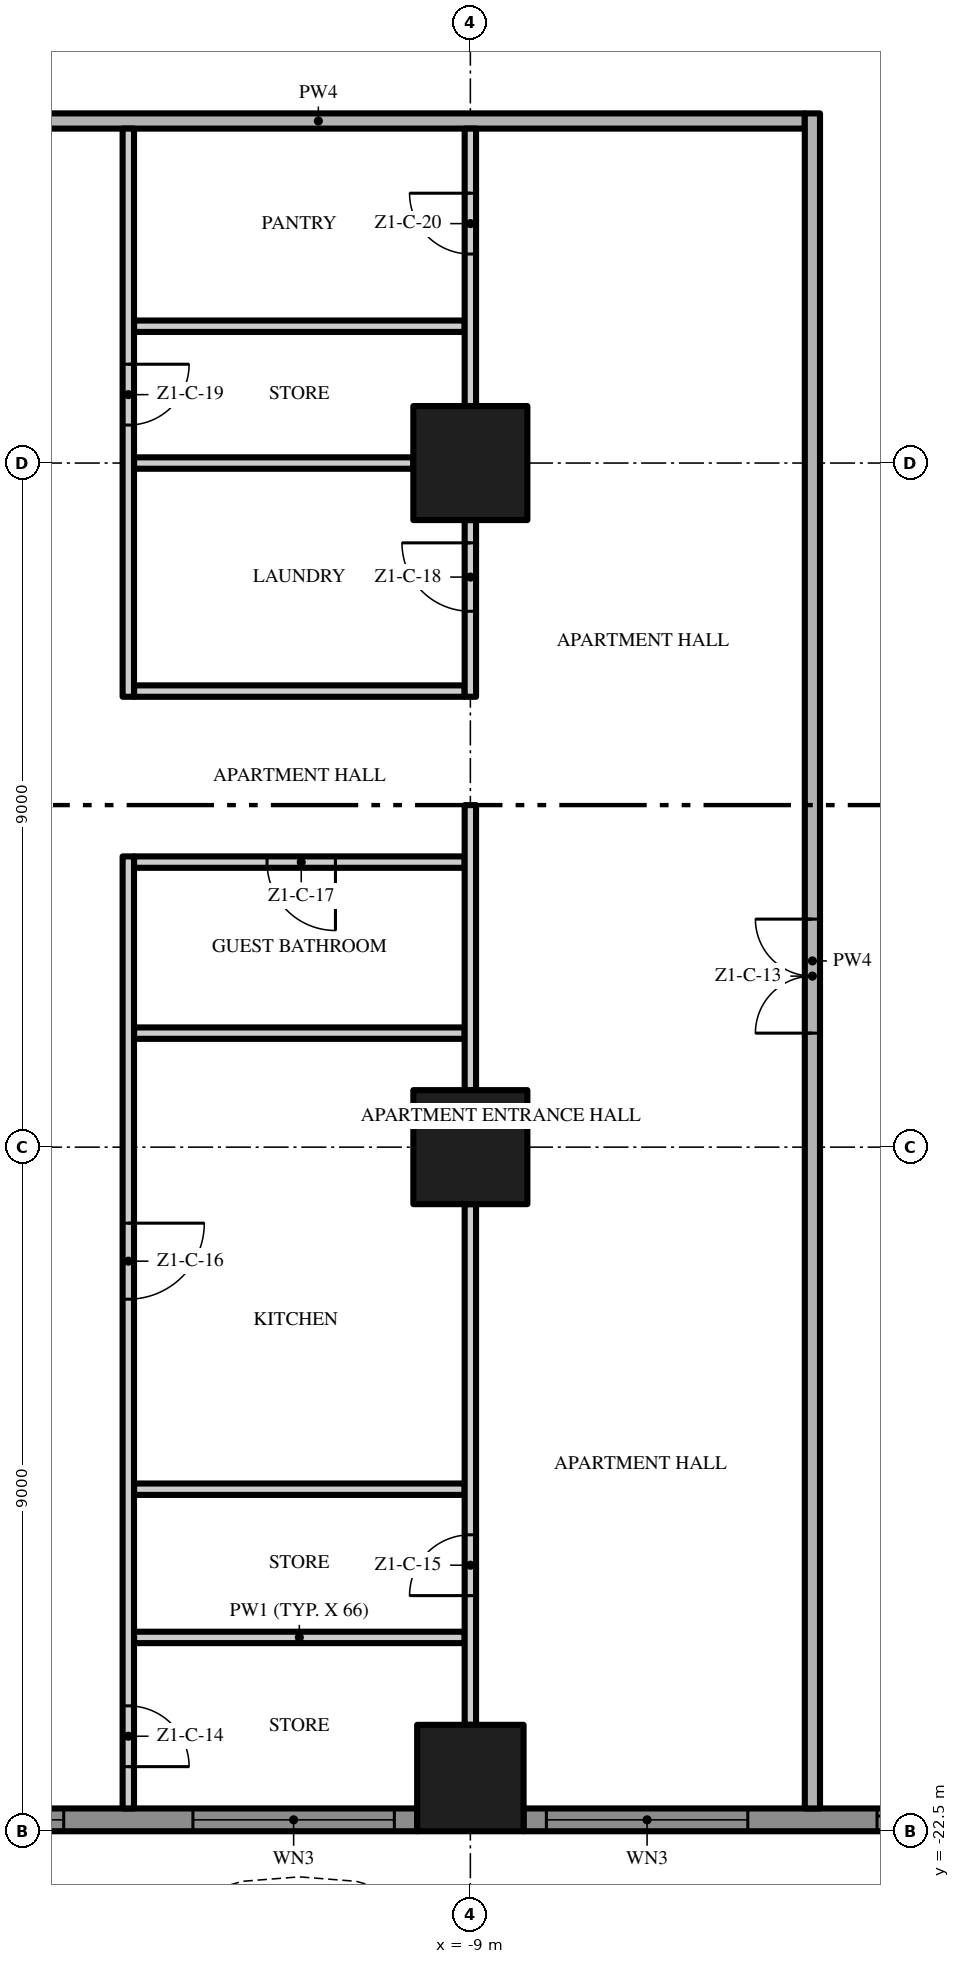
"""IFC4 building model, lengths in metres.
Left out: names, types, materials, properties, quantities, classifications, styles, units other than length and angle.
Written with IfcOpenShell. Run it as: python <this file> out.ifc"""

import sys

from ifc_helpers import new_model, si_unit, direction, frame, frame_2d, origin, origin_2d, place, context, subcontext, project, spatial, polyline, rectangle, outline, extrude, element, fill, save


model = new_model("IFC4")
c1 = context("Model", 3, precision=1e-05, world=origin(), true_north=direction((0.0, 1.0)))
c2 = subcontext(c1, "Body", "Model", "MODEL_VIEW")
j1 = project(units=[si_unit("LENGTHUNIT", "METRE"), si_unit("PLANEANGLEUNIT", "RADIAN")], contexts=[c1])
p1 = place(None, origin())
s1 = spatial("IfcSite", under=j1, at=p1, CompositionType="ELEMENT")
p2 = place(p1, origin())
s2 = spatial("IfcBuilding", under=s1, at=p2, CompositionType="ELEMENT")
p3 = place(p2, frame((0.0, 0.0, 45.4)))
s3 = spatial("IfcBuildingStorey", under=s2, at=p3, CompositionType="ELEMENT", Elevation=45.4)
p4 = place(p3, frame((-9.0, -13.5, 0.0), z_axis=(0.0, 0.0, 1.0), x_axis=(1.0, 0.0, 0.0)))
e1 = element("IfcColumn", 1, at=p4, inside=s3, PredefinedType="COLUMN", context=c2, shape_type="SweptSolid", body=[
    extrude(rectangle(XDim=1.5, YDim=1.5, at=origin_2d()), origin(), (0.0, 0.0, 1.0), 3.5),
])
p5 = place(p3, frame((-9.0, -21.8, 0.0), z_axis=(0.0, 0.0, 1.0), x_axis=(1.0, 0.0, 0.0)))
e2 = element("IfcColumn", 2, at=p5, inside=s3, PredefinedType="COLUMN", context=c2, shape_type="SweptSolid", body=[
    extrude(rectangle(XDim=1.4, YDim=1.4, at=origin_2d()), origin(), (0.0, 0.0, 1.0), 3.5),
])
p6 = place(p3, frame((-9.0, -4.5, 0.0), z_axis=(0.0, 0.0, 1.0), x_axis=(1.0, 0.0, 0.0)))
e3 = element("IfcColumn", 3, at=p6, inside=s3, PredefinedType="COLUMN", context=c2, shape_type="SweptSolid", body=[
    extrude(rectangle(XDim=1.5, YDim=1.5, at=origin_2d()), origin(), (0.0, 0.0, 1.0), 3.5),
])
p7 = place(p3, frame((-9.7, -22.35, 0.0), z_axis=(0.0, 0.0, 1.0), x_axis=(-1.0, 0.0, 0.0)))
e4 = element("IfcWall", 4, at=p7, inside=s3, PredefinedType="SOLIDWALL", context=c2, shape_type="SweptSolid", body=[
    extrude(rectangle(XDim=7.6, YDim=0.3, at=frame_2d((3.8, 0.0))), origin(), (0.0, 0.0, 1.0), 3.5),
])
p8 = place(p7, frame((4.65, 0.0, 0.45)))
e5 = element("IfcOpeningElement", 5, at=p8, cuts=e4, PredefinedType="OPENING", context=c2, shape_type="SweptSolid", body=[
    extrude(rectangle(XDim=2.65, YDim=2.65, at=frame_2d((1.325, 1.325))), frame((0.0, 0.16, 0.0), z_axis=(0.0, -1.0, 0.0), x_axis=(1.0, 0.0, 0.0)), (0.0, 0.0, 1.0), 0.32),
])
p9 = place(p7, frame((0.3, 0.0, 0.45)))
e6 = element("IfcOpeningElement", 6, at=p9, cuts=e4, PredefinedType="OPENING", context=c2, shape_type="SweptSolid", body=[
    extrude(rectangle(XDim=2.65, YDim=2.65, at=frame_2d((1.325, 1.325))), frame((0.0, 0.16, 0.0), z_axis=(0.0, -1.0, 0.0), x_axis=(1.0, 0.0, 0.0)), (0.0, 0.0, 1.0), 0.32),
])
p10 = place(p3, frame((-0.7, -22.35, 0.0), z_axis=(0.0, 0.0, 1.0), x_axis=(-1.0, 0.0, 0.0)))
e7 = element("IfcWall", 7, at=p10, inside=s3, PredefinedType="SOLIDWALL", context=c2, shape_type="SweptSolid", body=[
    extrude(rectangle(XDim=7.6, YDim=0.3, at=frame_2d((3.8, 0.0))), origin(), (0.0, 0.0, 1.0), 3.5),
])
p11 = place(p10, frame((4.65, 0.0, 0.45)))
e8 = element("IfcOpeningElement", 8, at=p11, cuts=e7, PredefinedType="OPENING", context=c2, shape_type="SweptSolid", body=[
    extrude(rectangle(XDim=2.65, YDim=2.65, at=frame_2d((1.325, 1.325))), frame((0.0, 0.16, 0.0), z_axis=(0.0, -1.0, 0.0), x_axis=(1.0, 0.0, 0.0)), (0.0, 0.0, 1.0), 0.32),
])
p12 = place(p10, frame((0.3, 0.0, 0.0)))
e9 = element("IfcOpeningElement", 9, at=p12, cuts=e7, PredefinedType="OPENING", context=c2, shape_type="SweptSolid", body=[
    extrude(rectangle(XDim=2.65, YDim=2.4, at=frame_2d((1.325, 1.2))), frame((0.0, 0.16, 0.0), z_axis=(0.0, -1.0, 0.0), x_axis=(1.0, 0.0, 0.0)), (0.0, 0.0, 1.0), 0.32),
])
p13 = place(p3, origin())
e10 = element("IfcWall", 10, at=p13, inside=s3, PredefinedType="USERDEFINED", context=c2, shape_type="SweptSolid", body=[
    extrude(outline(polyline([(-22.5, -24.3), (-21.0, -25.005), (-19.5, -25.441), (-18.75, -25.5), (-18.0, -25.441), (-16.5, -25.005), (-15.0, -24.3), (-13.5, -23.595), (-12.0, -23.159), (-11.25, -23.1), (-10.5, -23.159), (-9.0, -23.595), (-7.5, -24.3), (-6.0, -25.005), (-4.5, -25.441), (-3.75, -25.5), (-3.0, -25.441), (-1.5, -25.005), (0.0, -24.3), (1.5, -23.595), (3.0, -23.159), (3.75, -23.1), (4.5, -23.159), (6.0, -23.595), (7.5, -24.3), (9.0, -25.005), (10.5, -25.441), (11.25, -25.5), (12.0, -25.441), (13.5, -25.005), (15.0, -24.3), (16.5, -23.595), (18.0, -23.159), (18.75, -23.1), (19.5, -23.159), (21.0, -23.595), (22.5, -24.3), (22.606, -24.074), (21.089, -23.36), (19.545, -22.911), (18.75, -22.849), (17.955, -22.911), (16.411, -23.36), (14.894, -24.074), (13.411, -24.771), (11.955, -25.194), (11.25, -25.249), (10.545, -25.194), (9.089, -24.771), (7.606, -24.074), (6.089, -23.36), (4.545, -22.911), (3.75, -22.849), (2.955, -22.911), (1.411, -23.36), (-0.106, -24.074), (-1.589, -24.771), (-3.045, -25.194), (-3.75, -25.249), (-4.455, -25.194), (-5.911, -24.771), (-7.394, -24.074), (-8.911, -23.36), (-10.455, -22.911), (-11.25, -22.849), (-12.045, -22.911), (-13.589, -23.36), (-15.106, -24.074), (-16.589, -24.771), (-18.045, -25.194), (-18.75, -25.249), (-19.455, -25.194), (-20.911, -24.771), (-22.394, -24.074), (-22.5, -24.3)])), origin(), (0.0, 0.0, 1.0), 0.9),
])
for number, where, z_axis, x_axis in (
    (11, (-13.425, -19.95, 0.0), (0.0, 0.0, 1.0), (1.0, 0.0, 0.0)),
    (12, (-13.425, -18.0, 0.0), (0.0, 0.0, 1.0), (1.0, 0.0, 0.0)),
    (13, (-13.425, -12.0, 0.0), (0.0, 0.0, 1.0), (1.0, 0.0, 0.0)),
):
    element("IfcWall", number, at=place(p3, frame(where, z_axis=z_axis, x_axis=x_axis)), inside=s3, PredefinedType="PARTITIONING", context=c2, shape_type="SweptSolid", body=[
        extrude(rectangle(XDim=4.35, YDim=0.15, at=frame_2d((2.175, 0.0))), origin(), (0.0, 0.0, 1.0), 3.5),
    ])
p14 = place(p3, frame((-9.075, -9.75, 0.0), z_axis=(0.0, 0.0, 1.0), x_axis=(-1.0, 0.0, 0.0)))
e14 = element("IfcWall", 14, at=p14, inside=s3, PredefinedType="PARTITIONING", context=c2, shape_type="SweptSolid", body=[
    extrude(rectangle(XDim=4.35, YDim=0.15, at=frame_2d((2.175, 0.0))), origin(), (0.0, 0.0, 1.0), 3.5),
])
p15 = place(p14, frame((1.7, 0.0, 0.0)))
e15 = element("IfcOpeningElement", 15, at=p15, cuts=e14, PredefinedType="OPENING", context=c2, shape_type="SweptSolid", body=[
    extrude(rectangle(XDim=0.9, YDim=2.1, at=frame_2d((0.45, 1.05))), frame((0.0, 0.085, 0.0), z_axis=(0.0, -1.0, 0.0), x_axis=(1.0, 0.0, 0.0)), (0.0, 0.0, 1.0), 0.17),
])
p16 = place(p3, frame((-13.425, -7.5, 0.0), z_axis=(0.0, 0.0, 1.0), x_axis=(1.0, 0.0, 0.0)))
e16 = element("IfcWall", 16, at=p16, inside=s3, PredefinedType="PARTITIONING", context=c2, shape_type="SweptSolid", body=[
    extrude(rectangle(XDim=4.35, YDim=0.15, at=frame_2d((2.175, 0.0))), origin(), (0.0, 0.0, 1.0), 3.5),
])
p17 = place(p3, frame((-13.425, -4.5, 0.0), z_axis=(0.0, 0.0, 1.0), x_axis=(1.0, 0.0, 0.0)))
e17 = element("IfcWall", 17, at=p17, inside=s3, PredefinedType="PARTITIONING", context=c2, shape_type="SweptSolid", body=[
    extrude(rectangle(XDim=3.675, YDim=0.15, at=frame_2d((1.837, 0.0))), origin(), (0.0, 0.0, 1.0), 3.5),
])
p18 = place(p3, frame((-13.425, -2.7, 0.0), z_axis=(0.0, 0.0, 1.0), x_axis=(1.0, 0.0, 0.0)))
e18 = element("IfcWall", 18, at=p18, inside=s3, PredefinedType="PARTITIONING", context=c2, shape_type="SweptSolid", body=[
    extrude(rectangle(XDim=4.35, YDim=0.15, at=frame_2d((2.175, 0.0))), origin(), (0.0, 0.0, 1.0), 3.5),
])
p19 = place(p3, frame((-17.4, 0.0, 0.0), z_axis=(0.0, 0.0, 1.0), x_axis=(1.0, 0.0, 0.0)))
e19 = element("IfcWall", 19, at=p19, inside=s3, PredefinedType="PARTITIONING", context=c2, shape_type="SweptSolid", body=[
    extrude(rectangle(XDim=12.8, YDim=0.2, at=frame_2d((6.4, 0.0))), origin(), (0.0, 0.0, 1.0), 3.5),
])
p20 = place(p3, frame((-13.5, -9.675, 0.0), z_axis=(0.0, 0.0, 1.0), x_axis=(0.0, -1.0, 0.0)))
e20 = element("IfcWall", 20, at=p20, inside=s3, PredefinedType="PARTITIONING", context=c2, shape_type="SweptSolid", body=[
    extrude(rectangle(XDim=12.525, YDim=0.15, at=frame_2d((6.263, 0.0))), origin(), (0.0, 0.0, 1.0), 3.5),
])
p21 = place(p20, frame((11.175, 0.0, 0.0)))
e21 = element("IfcOpeningElement", 21, at=p21, cuts=e20, PredefinedType="OPENING", context=c2, shape_type="SweptSolid", body=[
    extrude(rectangle(XDim=0.8, YDim=2.0, at=frame_2d((0.4, 1.0))), frame((0.0, 0.085, 0.0), z_axis=(0.0, -1.0, 0.0), x_axis=(1.0, 0.0, 0.0)), (0.0, 0.0, 1.0), 0.17),
])
p22 = place(p20, frame((4.825, 0.0, 0.0)))
e22 = element("IfcOpeningElement", 22, at=p22, cuts=e20, PredefinedType="OPENING", context=c2, shape_type="SweptSolid", body=[
    extrude(rectangle(XDim=1.0, YDim=2.4, at=frame_2d((0.5, 1.2))), frame((0.0, 0.085, 0.0), z_axis=(0.0, -1.0, 0.0), x_axis=(1.0, 0.0, 0.0)), (0.0, 0.0, 1.0), 0.17),
])
p23 = place(p3, frame((-13.5, -0.1, 0.0), z_axis=(0.0, 0.0, 1.0), x_axis=(0.0, -1.0, 0.0)))
e23 = element("IfcWall", 23, at=p23, inside=s3, PredefinedType="PARTITIONING", context=c2, shape_type="SweptSolid", body=[
    extrude(rectangle(XDim=7.475, YDim=0.15, at=frame_2d((3.737, 0.0))), origin(), (0.0, 0.0, 1.0), 3.5),
])
p24 = place(p23, frame((3.1, 0.0, 0.0)))
e24 = element("IfcOpeningElement", 24, at=p24, cuts=e23, PredefinedType="OPENING", context=c2, shape_type="SweptSolid", body=[
    extrude(rectangle(XDim=0.8, YDim=2.0, at=frame_2d((0.4, 1.0))), frame((0.0, 0.085, 0.0), z_axis=(0.0, -1.0, 0.0), x_axis=(1.0, 0.0, 0.0)), (0.0, 0.0, 1.0), 0.17),
])
p25 = place(p3, frame((-9.0, -21.1, 0.0), z_axis=(0.0, 0.0, 1.0), x_axis=(0.0, 1.0, 0.0)))
e25 = element("IfcWall", 25, at=p25, inside=s3, PredefinedType="PARTITIONING", context=c2, shape_type="SweptSolid", body=[
    extrude(rectangle(XDim=6.85, YDim=0.15, at=frame_2d((3.425, 0.0))), origin(), (0.0, 0.0, 1.0), 3.5),
])
p26 = place(p25, frame((1.7, 0.0, 0.0)))
e26 = element("IfcOpeningElement", 26, at=p26, cuts=e25, PredefinedType="OPENING", context=c2, shape_type="SweptSolid", body=[
    extrude(rectangle(XDim=0.8, YDim=2.0, at=frame_2d((0.4, 1.0))), frame((0.0, 0.085, 0.0), z_axis=(0.0, -1.0, 0.0), x_axis=(1.0, 0.0, 0.0)), (0.0, 0.0, 1.0), 0.17),
])
p27 = place(p3, frame((-9.0, -12.75, 0.0), z_axis=(0.0, 0.0, 1.0), x_axis=(0.0, 1.0, 0.0)))
e27 = element("IfcWall", 27, at=p27, inside=s3, PredefinedType="PARTITIONING", context=c2, shape_type="SweptSolid", body=[
    extrude(rectangle(XDim=3.75, YDim=0.15, at=frame_2d((1.875, 0.0))), origin(), (0.0, 0.0, 1.0), 3.5),
])
p28 = place(p3, frame((-9.0, -7.575, 0.0), z_axis=(0.0, 0.0, 1.0), x_axis=(0.0, 1.0, 0.0)))
e28 = element("IfcWall", 28, at=p28, inside=s3, PredefinedType="PARTITIONING", context=c2, shape_type="SweptSolid", body=[
    extrude(rectangle(XDim=2.325, YDim=0.15, at=frame_2d((1.163, 0.0))), origin(), (0.0, 0.0, 1.0), 3.5),
])
p29 = place(p28, frame((1.125, 0.0, 0.0)))
e29 = element("IfcOpeningElement", 29, at=p29, cuts=e28, PredefinedType="OPENING", context=c2, shape_type="SweptSolid", body=[
    extrude(rectangle(XDim=0.9, YDim=2.1, at=frame_2d((0.45, 1.05))), frame((0.0, 0.085, 0.0), z_axis=(0.0, -1.0, 0.0), x_axis=(1.0, 0.0, 0.0)), (0.0, 0.0, 1.0), 0.17),
])
p30 = place(p3, frame((-9.0, -3.75, 0.0), z_axis=(0.0, 0.0, 1.0), x_axis=(0.0, 1.0, 0.0)))
e30 = element("IfcWall", 30, at=p30, inside=s3, PredefinedType="PARTITIONING", context=c2, shape_type="SweptSolid", body=[
    extrude(rectangle(XDim=3.65, YDim=0.15, at=frame_2d((1.825, 0.0))), origin(), (0.0, 0.0, 1.0), 3.5),
])
p31 = place(p30, frame((2.0, 0.0, 0.0)))
e31 = element("IfcOpeningElement", 31, at=p31, cuts=e30, PredefinedType="OPENING", context=c2, shape_type="SweptSolid", body=[
    extrude(rectangle(XDim=0.8, YDim=2.0, at=frame_2d((0.4, 1.0))), frame((0.0, 0.085, 0.0), z_axis=(0.0, -1.0, 0.0), x_axis=(1.0, 0.0, 0.0)), (0.0, 0.0, 1.0), 0.17),
])
p32 = place(p3, frame((-4.5, -22.2, 0.0), z_axis=(0.0, 0.0, 1.0), x_axis=(0.0, 1.0, 0.0)))
e32 = element("IfcWall", 32, at=p32, inside=s3, PredefinedType="PARTITIONING", context=c2, shape_type="SweptSolid", body=[
    extrude(rectangle(XDim=22.3, YDim=0.2, at=frame_2d((11.15, 0.0))), origin(), (0.0, 0.0, 1.0), 3.5),
])
p33 = place(p32, frame((10.2, 0.0, 0.0)))
e33 = element("IfcOpeningElement", 33, at=p33, cuts=e32, PredefinedType="OPENING", context=c2, shape_type="SweptSolid", body=[
    extrude(rectangle(XDim=1.5, YDim=2.4, at=frame_2d((0.75, 1.2))), frame((0.0, 0.11, 0.0), z_axis=(0.0, -1.0, 0.0), x_axis=(1.0, 0.0, 0.0)), (0.0, 0.0, 1.0), 0.22),
])
p34 = place(p8, origin())
e34 = element("IfcWindow", 34, at=p34, inside=s3, PartitioningType="SINGLE_PANEL", PredefinedType="WINDOW", context=c2, shape_type="SweptSolid", body=[
    extrude(rectangle(XDim=2.65, YDim=2.65, at=frame_2d((1.325, 1.325))), frame((0.0, 0.03, 0.0), z_axis=(0.0, -1.0, 0.0), x_axis=(1.0, 0.0, 0.0)), (0.0, 0.0, 1.0), 0.06),
])
fill(e5, e34)
p35 = place(p9, origin())
e35 = element("IfcWindow", 35, at=p35, inside=s3, PartitioningType="SINGLE_PANEL", PredefinedType="WINDOW", context=c2, shape_type="SweptSolid", body=[
    extrude(rectangle(XDim=2.65, YDim=2.65, at=frame_2d((1.325, 1.325))), frame((0.0, 0.03, 0.0), z_axis=(0.0, -1.0, 0.0), x_axis=(1.0, 0.0, 0.0)), (0.0, 0.0, 1.0), 0.06),
])
fill(e6, e35)
p36 = place(p11, origin())
e36 = element("IfcWindow", 36, at=p36, inside=s3, PartitioningType="SINGLE_PANEL", PredefinedType="WINDOW", context=c2, shape_type="SweptSolid", body=[
    extrude(rectangle(XDim=2.65, YDim=2.65, at=frame_2d((1.325, 1.325))), frame((0.0, 0.03, 0.0), z_axis=(0.0, -1.0, 0.0), x_axis=(1.0, 0.0, 0.0)), (0.0, 0.0, 1.0), 0.06),
])
fill(e8, e36)
p37 = place(p12, origin())
e37 = element("IfcDoor", 37, at=p37, inside=s3, OperationType="SINGLE_SWING_LEFT", PredefinedType="DOOR", context=c2, shape_type="SweptSolid", body=[
    extrude(rectangle(XDim=2.65, YDim=2.4, at=frame_2d((1.325, 1.2))), frame((0.0, 0.025, 0.0), z_axis=(0.0, -1.0, 0.0), x_axis=(1.0, 0.0, 0.0)), (0.0, 0.0, 1.0), 0.05),
])
fill(e9, e37)
p38 = place(p33, origin())
e38 = element("IfcDoor", 38, at=p38, inside=s3, OperationType="DOUBLE_DOOR_SINGLE_SWING", PredefinedType="DOOR", context=c2, shape_type="SweptSolid", body=[
    extrude(rectangle(XDim=1.5, YDim=2.4, at=frame_2d((0.75, 1.2))), frame((0.0, 0.025, 0.0), z_axis=(0.0, -1.0, 0.0), x_axis=(1.0, 0.0, 0.0)), (0.0, 0.0, 1.0), 0.05),
])
fill(e33, e38)
p39 = place(p21, origin())
e39 = element("IfcDoor", 39, at=p39, inside=s3, OperationType="SINGLE_SWING_RIGHT", PredefinedType="DOOR", context=c2, shape_type="SweptSolid", body=[
    extrude(rectangle(XDim=0.8, YDim=2.0, at=frame_2d((0.4, 1.0))), frame((0.0, 0.025, 0.0), z_axis=(0.0, -1.0, 0.0), x_axis=(1.0, 0.0, 0.0)), (0.0, 0.0, 1.0), 0.05),
])
fill(e21, e39)
p40 = place(p26, origin())
e40 = element("IfcDoor", 40, at=p40, inside=s3, OperationType="SINGLE_SWING_LEFT", PredefinedType="DOOR", context=c2, shape_type="SweptSolid", body=[
    extrude(rectangle(XDim=0.8, YDim=2.0, at=frame_2d((0.4, 1.0))), frame((0.0, 0.025, 0.0), z_axis=(0.0, -1.0, 0.0), x_axis=(1.0, 0.0, 0.0)), (0.0, 0.0, 1.0), 0.05),
])
fill(e26, e40)
p41 = place(p22, origin())
e41 = element("IfcDoor", 41, at=p41, inside=s3, OperationType="SINGLE_SWING_LEFT", PredefinedType="DOOR", context=c2, shape_type="SweptSolid", body=[
    extrude(rectangle(XDim=1.0, YDim=2.4, at=frame_2d((0.5, 1.2))), frame((0.0, 0.025, 0.0), z_axis=(0.0, -1.0, 0.0), x_axis=(1.0, 0.0, 0.0)), (0.0, 0.0, 1.0), 0.05),
])
fill(e22, e41)
p42 = place(p15, origin())
e42 = element("IfcDoor", 42, at=p42, inside=s3, OperationType="SINGLE_SWING_LEFT", PredefinedType="DOOR", context=c2, shape_type="SweptSolid", body=[
    extrude(rectangle(XDim=0.9, YDim=2.1, at=frame_2d((0.45, 1.05))), frame((0.0, 0.025, 0.0), z_axis=(0.0, -1.0, 0.0), x_axis=(1.0, 0.0, 0.0)), (0.0, 0.0, 1.0), 0.05),
])
fill(e15, e42)
p43 = place(p29, origin())
e43 = element("IfcDoor", 43, at=p43, inside=s3, OperationType="SINGLE_SWING_RIGHT", PredefinedType="DOOR", context=c2, shape_type="SweptSolid", body=[
    extrude(rectangle(XDim=0.9, YDim=2.1, at=frame_2d((0.45, 1.05))), frame((0.0, 0.025, 0.0), z_axis=(0.0, -1.0, 0.0), x_axis=(1.0, 0.0, 0.0)), (0.0, 0.0, 1.0), 0.05),
])
fill(e29, e43)
p44 = place(p24, origin())
e44 = element("IfcDoor", 44, at=p44, inside=s3, OperationType="SINGLE_SWING_LEFT", PredefinedType="DOOR", context=c2, shape_type="SweptSolid", body=[
    extrude(rectangle(XDim=0.8, YDim=2.0, at=frame_2d((0.4, 1.0))), frame((0.0, 0.025, 0.0), z_axis=(0.0, -1.0, 0.0), x_axis=(1.0, 0.0, 0.0)), (0.0, 0.0, 1.0), 0.05),
])
fill(e24, e44)
p45 = place(p31, origin())
e45 = element("IfcDoor", 45, at=p45, inside=s3, OperationType="SINGLE_SWING_RIGHT", PredefinedType="DOOR", context=c2, shape_type="SweptSolid", body=[
    extrude(rectangle(XDim=0.8, YDim=2.0, at=frame_2d((0.4, 1.0))), frame((0.0, 0.025, 0.0), z_axis=(0.0, -1.0, 0.0), x_axis=(1.0, 0.0, 0.0)), (0.0, 0.0, 1.0), 0.05),
])
fill(e31, e45)
save(model, sys.argv[1])
